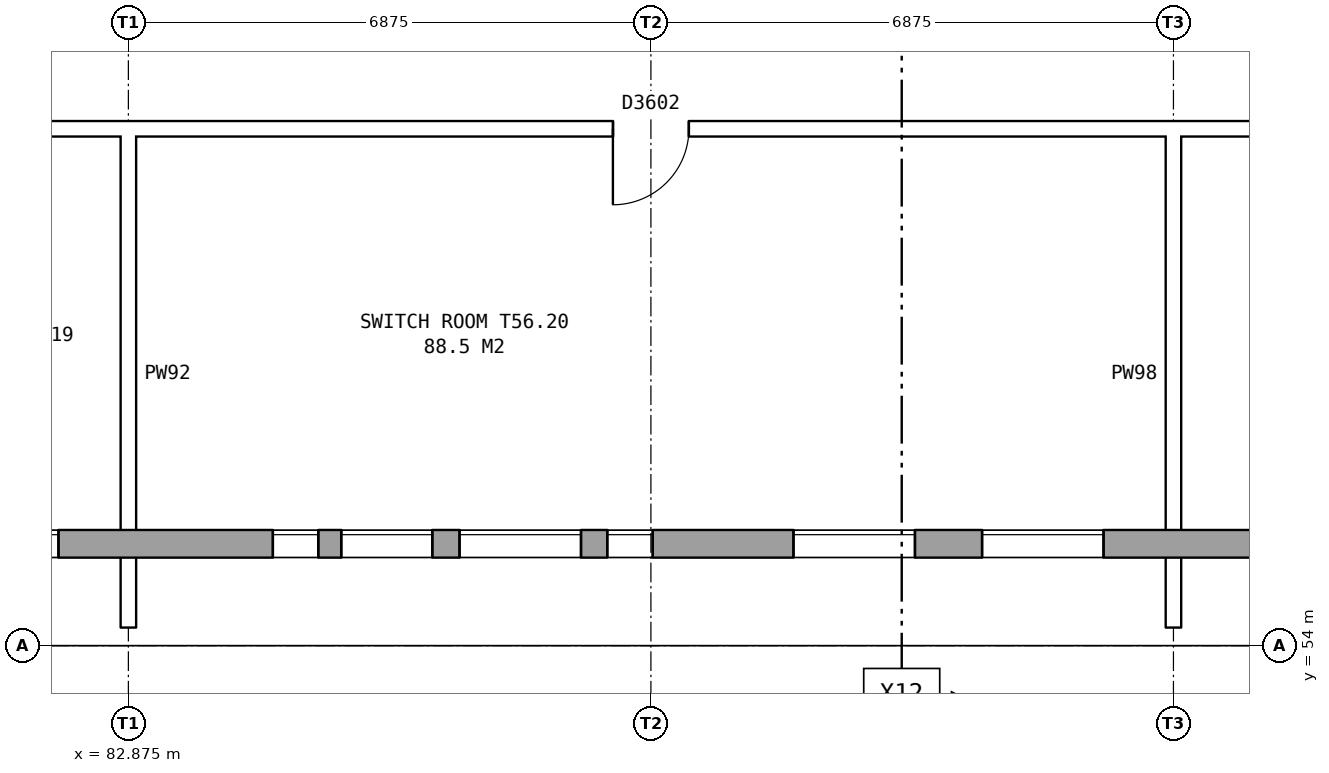
"""IFC4 building model, lengths in metres.
Left out: names, types, materials, properties, quantities, classifications, styles, units other than length and angle.
Written with IfcOpenShell. Run it as: python <this file> out.ifc"""

import sys

from ifc_helpers import new_model, si_unit, direction, frame, frame_2d, origin, place, context, subcontext, project, spatial, rectangle, extrude, element, fill, save


model = new_model("IFC4")
c1 = context("Model", 3, precision=1e-05, world=origin(), true_north=direction((0.0, 1.0)))
c2 = subcontext(c1, "Body", "Model", "MODEL_VIEW")
j1 = project(units=[si_unit("LENGTHUNIT", "METRE"), si_unit("PLANEANGLEUNIT", "RADIAN")], contexts=[c1])
p1 = place(None, origin())
s1 = spatial("IfcSite", under=j1, at=p1, CompositionType="ELEMENT")
p2 = place(p1, origin())
s2 = spatial("IfcBuilding", under=s1, at=p2, CompositionType="ELEMENT")
p3 = place(p2, frame((0.0, 0.0, 198.6)))
s3 = spatial("IfcBuildingStorey", under=s2, at=p3, CompositionType="ELEMENT", Elevation=198.6)
p4 = place(p3, frame((76.15, 55.34, 0.0), z_axis=(0.0, 0.0, 1.0), x_axis=(1.0, 0.0, 0.0)))
e1 = element("IfcWall", 1, at=p4, inside=s3, PredefinedType="STANDARD", context=c2, shape_type="SweptSolid", body=[
    extrude(rectangle(XDim=54.7, YDim=0.36, at=frame_2d((27.35, 0.0))), origin(), (0.0, 0.0, 1.0), 3.7),
])
p5 = place(p4, frame((1.75, 0.0, 1.5)))
e2 = element("IfcOpeningElement", 2, at=p5, cuts=e1, PredefinedType="OPENING", context=c2, shape_type="SweptSolid", body=[
    extrude(rectangle(XDim=0.6, YDim=1.2, at=frame_2d((0.3, 0.6))), frame((0.0, 0.19, 0.0), z_axis=(0.0, -1.0, 0.0), x_axis=(1.0, 0.0, 0.0)), (0.0, 0.0, 1.0), 0.38),
])
p6 = place(p4, frame((4.206, 0.0, 1.5)))
e3 = element("IfcOpeningElement", 3, at=p6, cuts=e1, PredefinedType="OPENING", context=c2, shape_type="SweptSolid", body=[
    extrude(rectangle(XDim=1.6, YDim=1.2, at=frame_2d((0.8, 0.6))), frame((0.0, 0.19, 0.0), z_axis=(0.0, -1.0, 0.0), x_axis=(1.0, 0.0, 0.0)), (0.0, 0.0, 1.0), 0.38),
])
p7 = place(p4, frame((8.625, 0.0, 1.5)))
e4 = element("IfcOpeningElement", 4, at=p7, cuts=e1, PredefinedType="OPENING", context=c2, shape_type="SweptSolid", body=[
    extrude(rectangle(XDim=0.6, YDim=1.2, at=frame_2d((0.3, 0.6))), frame((0.0, 0.19, 0.0), z_axis=(0.0, -1.0, 0.0), x_axis=(1.0, 0.0, 0.0)), (0.0, 0.0, 1.0), 0.38),
])
p8 = place(p4, frame((11.081, 0.0, 1.5)))
e5 = element("IfcOpeningElement", 5, at=p8, cuts=e1, PredefinedType="OPENING", context=c2, shape_type="SweptSolid", body=[
    extrude(rectangle(XDim=1.6, YDim=1.2, at=frame_2d((0.8, 0.6))), frame((0.0, 0.19, 0.0), z_axis=(0.0, -1.0, 0.0), x_axis=(1.0, 0.0, 0.0)), (0.0, 0.0, 1.0), 0.38),
])
p9 = place(p4, frame((9.525, 0.0, 1.5)))
e6 = element("IfcOpeningElement", 6, at=p9, cuts=e1, PredefinedType="OPENING", context=c2, shape_type="SweptSolid", body=[
    extrude(rectangle(XDim=1.2, YDim=1.2, at=frame_2d((0.6, 0.6))), frame((0.0, 0.19, 0.0), z_axis=(0.0, -1.0, 0.0), x_axis=(1.0, 0.0, 0.0)), (0.0, 0.0, 1.0), 0.38),
])
p10 = place(p4, frame((17.956, 0.0, 1.5)))
e7 = element("IfcOpeningElement", 7, at=p10, cuts=e1, PredefinedType="OPENING", context=c2, shape_type="SweptSolid", body=[
    extrude(rectangle(XDim=1.6, YDim=1.2, at=frame_2d((0.8, 0.6))), frame((0.0, 0.19, 0.0), z_axis=(0.0, -1.0, 0.0), x_axis=(1.0, 0.0, 0.0)), (0.0, 0.0, 1.0), 0.38),
])
p11 = place(p4, frame((22.375, 0.0, 1.5)))
e8 = element("IfcOpeningElement", 8, at=p11, cuts=e1, PredefinedType="OPENING", context=c2, shape_type="SweptSolid", body=[
    extrude(rectangle(XDim=1.6, YDim=1.2, at=frame_2d((0.8, 0.6))), frame((0.0, 0.19, 0.0), z_axis=(0.0, -1.0, 0.0), x_axis=(1.0, 0.0, 0.0)), (0.0, 0.0, 1.0), 0.38),
])
p12 = place(p4, frame((24.831, 0.0, 1.5)))
e9 = element("IfcOpeningElement", 9, at=p12, cuts=e1, PredefinedType="OPENING", context=c2, shape_type="SweptSolid", body=[
    extrude(rectangle(XDim=1.6, YDim=1.2, at=frame_2d((0.8, 0.6))), frame((0.0, 0.19, 0.0), z_axis=(0.0, -1.0, 0.0), x_axis=(1.0, 0.0, 0.0)), (0.0, 0.0, 1.0), 0.38),
])
p13 = place(p4, frame((28.269, 0.0, 1.5)))
e10 = element("IfcOpeningElement", 10, at=p13, cuts=e1, PredefinedType="OPENING", context=c2, shape_type="SweptSolid", body=[
    extrude(rectangle(XDim=1.6, YDim=1.2, at=frame_2d((0.8, 0.6))), frame((0.0, 0.19, 0.0), z_axis=(0.0, -1.0, 0.0), x_axis=(1.0, 0.0, 0.0)), (0.0, 0.0, 1.0), 0.38),
])
p14 = place(p4, frame((26.775, 0.0, 1.5)))
e11 = element("IfcOpeningElement", 11, at=p14, cuts=e1, PredefinedType="OPENING", context=c2, shape_type="SweptSolid", body=[
    extrude(rectangle(XDim=0.9, YDim=1.2, at=frame_2d((0.45, 0.6))), frame((0.0, 0.19, 0.0), z_axis=(0.0, -1.0, 0.0), x_axis=(1.0, 0.0, 0.0)), (0.0, 0.0, 1.0), 0.38),
])
p15 = place(p4, frame((35.144, 0.0, 1.5)))
e12 = element("IfcOpeningElement", 12, at=p15, cuts=e1, PredefinedType="OPENING", context=c2, shape_type="SweptSolid", body=[
    extrude(rectangle(XDim=1.6, YDim=1.2, at=frame_2d((0.8, 0.6))), frame((0.0, 0.19, 0.0), z_axis=(0.0, -1.0, 0.0), x_axis=(1.0, 0.0, 0.0)), (0.0, 0.0, 1.0), 0.38),
])
p16 = place(p4, frame((37.075, 0.0, 1.5)))
e13 = element("IfcOpeningElement", 13, at=p16, cuts=e1, PredefinedType="OPENING", context=c2, shape_type="SweptSolid", body=[
    extrude(rectangle(XDim=0.6, YDim=1.2, at=frame_2d((0.3, 0.6))), frame((0.0, 0.19, 0.0), z_axis=(0.0, -1.0, 0.0), x_axis=(1.0, 0.0, 0.0)), (0.0, 0.0, 1.0), 0.38),
])
p17 = place(p4, frame((42.019, 0.0, 1.5)))
e14 = element("IfcOpeningElement", 14, at=p17, cuts=e1, PredefinedType="OPENING", context=c2, shape_type="SweptSolid", body=[
    extrude(rectangle(XDim=1.6, YDim=1.2, at=frame_2d((0.8, 0.6))), frame((0.0, 0.19, 0.0), z_axis=(0.0, -1.0, 0.0), x_axis=(1.0, 0.0, 0.0)), (0.0, 0.0, 1.0), 0.38),
])
p18 = place(p4, frame((37.975, 0.0, 1.5)))
e15 = element("IfcOpeningElement", 15, at=p18, cuts=e1, PredefinedType="OPENING", context=c2, shape_type="SweptSolid", body=[
    extrude(rectangle(XDim=1.2, YDim=1.2, at=frame_2d((0.6, 0.6))), frame((0.0, 0.19, 0.0), z_axis=(0.0, -1.0, 0.0), x_axis=(1.0, 0.0, 0.0)), (0.0, 0.0, 1.0), 0.38),
])
p19 = place(p4, frame((48.894, 0.0, 1.5)))
e16 = element("IfcOpeningElement", 16, at=p19, cuts=e1, PredefinedType="OPENING", context=c2, shape_type="SweptSolid", body=[
    extrude(rectangle(XDim=1.6, YDim=1.2, at=frame_2d((0.8, 0.6))), frame((0.0, 0.19, 0.0), z_axis=(0.0, -1.0, 0.0), x_axis=(1.0, 0.0, 0.0)), (0.0, 0.0, 1.0), 0.38),
])
p20 = place(p4, frame((50.825, 0.0, 1.5)))
e17 = element("IfcOpeningElement", 17, at=p20, cuts=e1, PredefinedType="OPENING", context=c2, shape_type="SweptSolid", body=[
    extrude(rectangle(XDim=0.6, YDim=1.2, at=frame_2d((0.3, 0.6))), frame((0.0, 0.19, 0.0), z_axis=(0.0, -1.0, 0.0), x_axis=(1.0, 0.0, 0.0)), (0.0, 0.0, 1.0), 0.38),
])
p21 = place(p4, frame((2.65, 0.0, 1.5)))
e18 = element("IfcOpeningElement", 18, at=p21, cuts=e1, PredefinedType="OPENING", context=c2, shape_type="SweptSolid", body=[
    extrude(rectangle(XDim=1.2, YDim=1.2, at=frame_2d((0.6, 0.6))), frame((0.0, 0.19, 0.0), z_axis=(0.0, -1.0, 0.0), x_axis=(1.0, 0.0, 0.0)), (0.0, 0.0, 1.0), 0.38),
])
p22 = place(p4, frame((13.025, 0.0, 1.5)))
e19 = element("IfcOpeningElement", 19, at=p22, cuts=e1, PredefinedType="OPENING", context=c2, shape_type="SweptSolid", body=[
    extrude(rectangle(XDim=0.6, YDim=1.2, at=frame_2d((0.3, 0.6))), frame((0.0, 0.19, 0.0), z_axis=(0.0, -1.0, 0.0), x_axis=(1.0, 0.0, 0.0)), (0.0, 0.0, 1.0), 0.38),
])
p23 = place(p4, frame((15.475, 0.0, 1.5)))
e20 = element("IfcOpeningElement", 20, at=p23, cuts=e1, PredefinedType="OPENING", context=c2, shape_type="SweptSolid", body=[
    extrude(rectangle(XDim=1.6, YDim=1.2, at=frame_2d((0.8, 0.6))), frame((0.0, 0.19, 0.0), z_axis=(0.0, -1.0, 0.0), x_axis=(1.0, 0.0, 0.0)), (0.0, 0.0, 1.0), 0.38),
])
p24 = place(p4, frame((30.175, 0.0, 1.5)))
e21 = element("IfcOpeningElement", 21, at=p24, cuts=e1, PredefinedType="OPENING", context=c2, shape_type="SweptSolid", body=[
    extrude(rectangle(XDim=1.6, YDim=1.2, at=frame_2d((0.8, 0.6))), frame((0.0, 0.19, 0.0), z_axis=(0.0, -1.0, 0.0), x_axis=(1.0, 0.0, 0.0)), (0.0, 0.0, 1.0), 0.38),
])
p25 = place(p4, frame((41.075, 0.0, 1.5)))
e22 = element("IfcOpeningElement", 22, at=p25, cuts=e1, PredefinedType="OPENING", context=c2, shape_type="SweptSolid", body=[
    extrude(rectangle(XDim=0.6, YDim=1.2, at=frame_2d((0.3, 0.6))), frame((0.0, 0.19, 0.0), z_axis=(0.0, -1.0, 0.0), x_axis=(1.0, 0.0, 0.0)), (0.0, 0.0, 1.0), 0.38),
])
p26 = place(p4, frame((43.925, 0.0, 1.5)))
e23 = element("IfcOpeningElement", 23, at=p26, cuts=e1, PredefinedType="OPENING", context=c2, shape_type="SweptSolid", body=[
    extrude(rectangle(XDim=1.6, YDim=1.2, at=frame_2d((0.8, 0.6))), frame((0.0, 0.19, 0.0), z_axis=(0.0, -1.0, 0.0), x_axis=(1.0, 0.0, 0.0)), (0.0, 0.0, 1.0), 0.38),
])
p27 = place(p4, frame((51.725, 0.0, 1.5)))
e24 = element("IfcOpeningElement", 24, at=p27, cuts=e1, PredefinedType="OPENING", context=c2, shape_type="SweptSolid", body=[
    extrude(rectangle(XDim=1.2, YDim=1.2, at=frame_2d((0.6, 0.6))), frame((0.0, 0.19, 0.0), z_axis=(0.0, -1.0, 0.0), x_axis=(1.0, 0.0, 0.0)), (0.0, 0.0, 1.0), 0.38),
])
p28 = place(p3, frame((32.24, 60.8, 0.0), z_axis=(0.0, 0.0, 1.0), x_axis=(1.0, 0.0, 0.0)))
e25 = element("IfcWall", 25, at=p28, inside=s3, PredefinedType="PARTITIONING", context=c2, shape_type="SweptSolid", body=[
    extrude(rectangle(XDim=136.52, YDim=0.2, at=frame_2d((68.26, 0.0))), origin(), (0.0, 0.0, 1.0), 3.7),
])
p29 = place(p28, frame((1.94, 0.0, 0.0)))
e26 = element("IfcOpeningElement", 26, at=p29, cuts=e25, PredefinedType="OPENING", context=c2, shape_type="SweptSolid", body=[
    extrude(rectangle(XDim=1.0, YDim=2.1, at=frame_2d((0.5, 1.05))), frame((0.0, 0.11, 0.0), z_axis=(0.0, -1.0, 0.0), x_axis=(1.0, 0.0, 0.0)), (0.0, 0.0, 1.0), 0.22),
])
p30 = place(p28, frame((8.76, 0.0, 0.0)))
e27 = element("IfcOpeningElement", 27, at=p30, cuts=e25, PredefinedType="OPENING", context=c2, shape_type="SweptSolid", body=[
    extrude(rectangle(XDim=1.0, YDim=2.1, at=frame_2d((0.5, 1.05))), frame((0.0, 0.11, 0.0), z_axis=(0.0, -1.0, 0.0), x_axis=(1.0, 0.0, 0.0)), (0.0, 0.0, 1.0), 0.22),
])
p31 = place(p28, frame((20.46, 0.0, 0.0)))
e28 = element("IfcOpeningElement", 28, at=p31, cuts=e25, PredefinedType="OPENING", context=c2, shape_type="SweptSolid", body=[
    extrude(rectangle(XDim=1.0, YDim=2.1, at=frame_2d((0.5, 1.05))), frame((0.0, 0.11, 0.0), z_axis=(0.0, -1.0, 0.0), x_axis=(1.0, 0.0, 0.0)), (0.0, 0.0, 1.0), 0.22),
])
p32 = place(p28, frame((30.06, 0.0, 0.0)))
e29 = element("IfcOpeningElement", 29, at=p32, cuts=e25, PredefinedType="OPENING", context=c2, shape_type="SweptSolid", body=[
    extrude(rectangle(XDim=1.0, YDim=2.1, at=frame_2d((0.5, 1.05))), frame((0.0, 0.11, 0.0), z_axis=(0.0, -1.0, 0.0), x_axis=(1.0, 0.0, 0.0)), (0.0, 0.0, 1.0), 0.22),
])
p33 = place(p28, frame((40.08, 0.0, 0.0)))
e30 = element("IfcOpeningElement", 30, at=p33, cuts=e25, PredefinedType="OPENING", context=c2, shape_type="SweptSolid", body=[
    extrude(rectangle(XDim=1.0, YDim=2.1, at=frame_2d((0.5, 1.05))), frame((0.0, 0.11, 0.0), z_axis=(0.0, -1.0, 0.0), x_axis=(1.0, 0.0, 0.0)), (0.0, 0.0, 1.0), 0.22),
])
p34 = place(p28, frame((46.517, 0.0, 0.0)))
e31 = element("IfcOpeningElement", 31, at=p34, cuts=e25, PredefinedType="OPENING", context=c2, shape_type="SweptSolid", body=[
    extrude(rectangle(XDim=1.0, YDim=2.1, at=frame_2d((0.5, 1.05))), frame((0.0, 0.11, 0.0), z_axis=(0.0, -1.0, 0.0), x_axis=(1.0, 0.0, 0.0)), (0.0, 0.0, 1.0), 0.22),
])
p35 = place(p28, frame((57.01, 0.0, 0.0)))
e32 = element("IfcOpeningElement", 32, at=p35, cuts=e25, PredefinedType="OPENING", context=c2, shape_type="SweptSolid", body=[
    extrude(rectangle(XDim=1.0, YDim=2.1, at=frame_2d((0.5, 1.05))), frame((0.0, 0.11, 0.0), z_axis=(0.0, -1.0, 0.0), x_axis=(1.0, 0.0, 0.0)), (0.0, 0.0, 1.0), 0.22),
])
p36 = place(p28, frame((70.76, 0.0, 0.0)))
e33 = element("IfcOpeningElement", 33, at=p36, cuts=e25, PredefinedType="OPENING", context=c2, shape_type="SweptSolid", body=[
    extrude(rectangle(XDim=1.0, YDim=2.1, at=frame_2d((0.5, 1.05))), frame((0.0, 0.11, 0.0), z_axis=(0.0, -1.0, 0.0), x_axis=(1.0, 0.0, 0.0)), (0.0, 0.0, 1.0), 0.22),
])
p37 = place(p28, frame((84.51, 0.0, 0.0)))
e34 = element("IfcOpeningElement", 34, at=p37, cuts=e25, PredefinedType="OPENING", context=c2, shape_type="SweptSolid", body=[
    extrude(rectangle(XDim=1.0, YDim=2.1, at=frame_2d((0.5, 1.05))), frame((0.0, 0.11, 0.0), z_axis=(0.0, -1.0, 0.0), x_axis=(1.0, 0.0, 0.0)), (0.0, 0.0, 1.0), 0.22),
])
p38 = place(p28, frame((95.003, 0.0, 0.0)))
e35 = element("IfcOpeningElement", 35, at=p38, cuts=e25, PredefinedType="OPENING", context=c2, shape_type="SweptSolid", body=[
    extrude(rectangle(XDim=1.0, YDim=2.1, at=frame_2d((0.5, 1.05))), frame((0.0, 0.11, 0.0), z_axis=(0.0, -1.0, 0.0), x_axis=(1.0, 0.0, 0.0)), (0.0, 0.0, 1.0), 0.22),
])
p39 = place(p28, frame((101.44, 0.0, 0.0)))
e36 = element("IfcOpeningElement", 36, at=p39, cuts=e25, PredefinedType="OPENING", context=c2, shape_type="SweptSolid", body=[
    extrude(rectangle(XDim=1.0, YDim=2.1, at=frame_2d((0.5, 1.05))), frame((0.0, 0.11, 0.0), z_axis=(0.0, -1.0, 0.0), x_axis=(1.0, 0.0, 0.0)), (0.0, 0.0, 1.0), 0.22),
])
p40 = place(p28, frame((111.56, 0.0, 0.0)))
e37 = element("IfcOpeningElement", 37, at=p40, cuts=e25, PredefinedType="OPENING", context=c2, shape_type="SweptSolid", body=[
    extrude(rectangle(XDim=1.0, YDim=2.1, at=frame_2d((0.5, 1.05))), frame((0.0, 0.11, 0.0), z_axis=(0.0, -1.0, 0.0), x_axis=(1.0, 0.0, 0.0)), (0.0, 0.0, 1.0), 0.22),
])
p41 = place(p28, frame((123.56, 0.0, 0.0)))
e38 = element("IfcOpeningElement", 38, at=p41, cuts=e25, PredefinedType="OPENING", context=c2, shape_type="SweptSolid", body=[
    extrude(rectangle(XDim=1.0, YDim=2.1, at=frame_2d((0.5, 1.05))), frame((0.0, 0.11, 0.0), z_axis=(0.0, -1.0, 0.0), x_axis=(1.0, 0.0, 0.0)), (0.0, 0.0, 1.0), 0.22),
])
p42 = place(p28, frame((132.08, 0.0, 0.0)))
e39 = element("IfcOpeningElement", 39, at=p42, cuts=e25, PredefinedType="OPENING", context=c2, shape_type="SweptSolid", body=[
    extrude(rectangle(XDim=1.0, YDim=2.1, at=frame_2d((0.5, 1.05))), frame((0.0, 0.11, 0.0), z_axis=(0.0, -1.0, 0.0), x_axis=(1.0, 0.0, 0.0)), (0.0, 0.0, 1.0), 0.22),
])
for number, where, z_axis, x_axis in (
    (40, (82.875, 54.24, 0.0), (0.0, 0.0, 1.0), (0.0, 1.0, 0.0)),
    (41, (96.625, 54.24, 0.0), (0.0, 0.0, 1.0), (0.0, 1.0, 0.0)),
):
    element("IfcWall", number, at=place(p3, frame(where, z_axis=z_axis, x_axis=x_axis)), inside=s3, PredefinedType="PARTITIONING", context=c2, shape_type="SweptSolid", body=[
        extrude(rectangle(XDim=6.66, YDim=0.2, at=frame_2d((3.33, 0.0))), origin(), (0.0, 0.0, 1.0), 3.167),
    ])
p43 = place(p6, origin())
e42 = element("IfcWindow", 42, at=p43, inside=s3, PartitioningType="DOUBLE_PANEL_HORIZONTAL", PredefinedType="WINDOW", context=c2, shape_type="SweptSolid", body=[
    extrude(rectangle(XDim=1.6, YDim=1.2, at=frame_2d((0.8, 0.6))), frame((0.0, 0.15, 0.0), z_axis=(0.0, -1.0, 0.0), x_axis=(1.0, 0.0, 0.0)), (0.0, 0.0, 1.0), 0.06),
])
fill(e3, e42)
p44 = place(p7, origin())
e43 = element("IfcWindow", 43, at=p44, inside=s3, PartitioningType="DOUBLE_PANEL_HORIZONTAL", PredefinedType="WINDOW", context=c2, shape_type="SweptSolid", body=[
    extrude(rectangle(XDim=0.6, YDim=1.2, at=frame_2d((0.3, 0.6))), frame((0.0, 0.15, 0.0), z_axis=(0.0, -1.0, 0.0), x_axis=(1.0, 0.0, 0.0)), (0.0, 0.0, 1.0), 0.06),
])
fill(e4, e43)
p45 = place(p8, origin())
e44 = element("IfcWindow", 44, at=p45, inside=s3, PartitioningType="DOUBLE_PANEL_HORIZONTAL", PredefinedType="WINDOW", context=c2, shape_type="SweptSolid", body=[
    extrude(rectangle(XDim=1.6, YDim=1.2, at=frame_2d((0.8, 0.6))), frame((0.0, 0.15, 0.0), z_axis=(0.0, -1.0, 0.0), x_axis=(1.0, 0.0, 0.0)), (0.0, 0.0, 1.0), 0.06),
])
fill(e5, e44)
p46 = place(p9, origin())
e45 = element("IfcWindow", 45, at=p46, inside=s3, PartitioningType="DOUBLE_PANEL_HORIZONTAL", PredefinedType="WINDOW", context=c2, shape_type="SweptSolid", body=[
    extrude(rectangle(XDim=1.2, YDim=1.2, at=frame_2d((0.6, 0.6))), frame((0.0, 0.15, 0.0), z_axis=(0.0, -1.0, 0.0), x_axis=(1.0, 0.0, 0.0)), (0.0, 0.0, 1.0), 0.06),
])
fill(e6, e45)
p47 = place(p10, origin())
e46 = element("IfcWindow", 46, at=p47, inside=s3, PartitioningType="DOUBLE_PANEL_HORIZONTAL", PredefinedType="WINDOW", context=c2, shape_type="SweptSolid", body=[
    extrude(rectangle(XDim=1.6, YDim=1.2, at=frame_2d((0.8, 0.6))), frame((0.0, 0.15, 0.0), z_axis=(0.0, -1.0, 0.0), x_axis=(1.0, 0.0, 0.0)), (0.0, 0.0, 1.0), 0.06),
])
fill(e7, e46)
p48 = place(p35, frame((1.0, 0.0, 0.0), z_axis=(0.0, 0.0, 1.0), x_axis=(-1.0, 0.0, 0.0)))
e47 = element("IfcDoor", 47, at=p48, inside=s3, OperationType="SINGLE_SWING_RIGHT", PredefinedType="DOOR", context=c2, shape_type="SweptSolid", body=[
    extrude(rectangle(XDim=1.0, YDim=2.1, at=frame_2d((0.5, 1.05))), frame((0.0, 0.025, 0.0), z_axis=(0.0, -1.0, 0.0), x_axis=(1.0, 0.0, 0.0)), (0.0, 0.0, 1.0), 0.05),
])
fill(e32, e47)
p49 = place(p22, origin())
e48 = element("IfcWindow", 48, at=p49, inside=s3, PartitioningType="DOUBLE_PANEL_HORIZONTAL", PredefinedType="WINDOW", context=c2, shape_type="SweptSolid", body=[
    extrude(rectangle(XDim=0.6, YDim=1.2, at=frame_2d((0.3, 0.6))), frame((0.0, 0.15, 0.0), z_axis=(0.0, -1.0, 0.0), x_axis=(1.0, 0.0, 0.0)), (0.0, 0.0, 1.0), 0.06),
])
fill(e19, e48)
p50 = place(p23, origin())
e49 = element("IfcWindow", 49, at=p50, inside=s3, PartitioningType="DOUBLE_PANEL_HORIZONTAL", PredefinedType="WINDOW", context=c2, shape_type="SweptSolid", body=[
    extrude(rectangle(XDim=1.6, YDim=1.2, at=frame_2d((0.8, 0.6))), frame((0.0, 0.15, 0.0), z_axis=(0.0, -1.0, 0.0), x_axis=(1.0, 0.0, 0.0)), (0.0, 0.0, 1.0), 0.06),
])
fill(e20, e49)
save(model, sys.argv[1])
